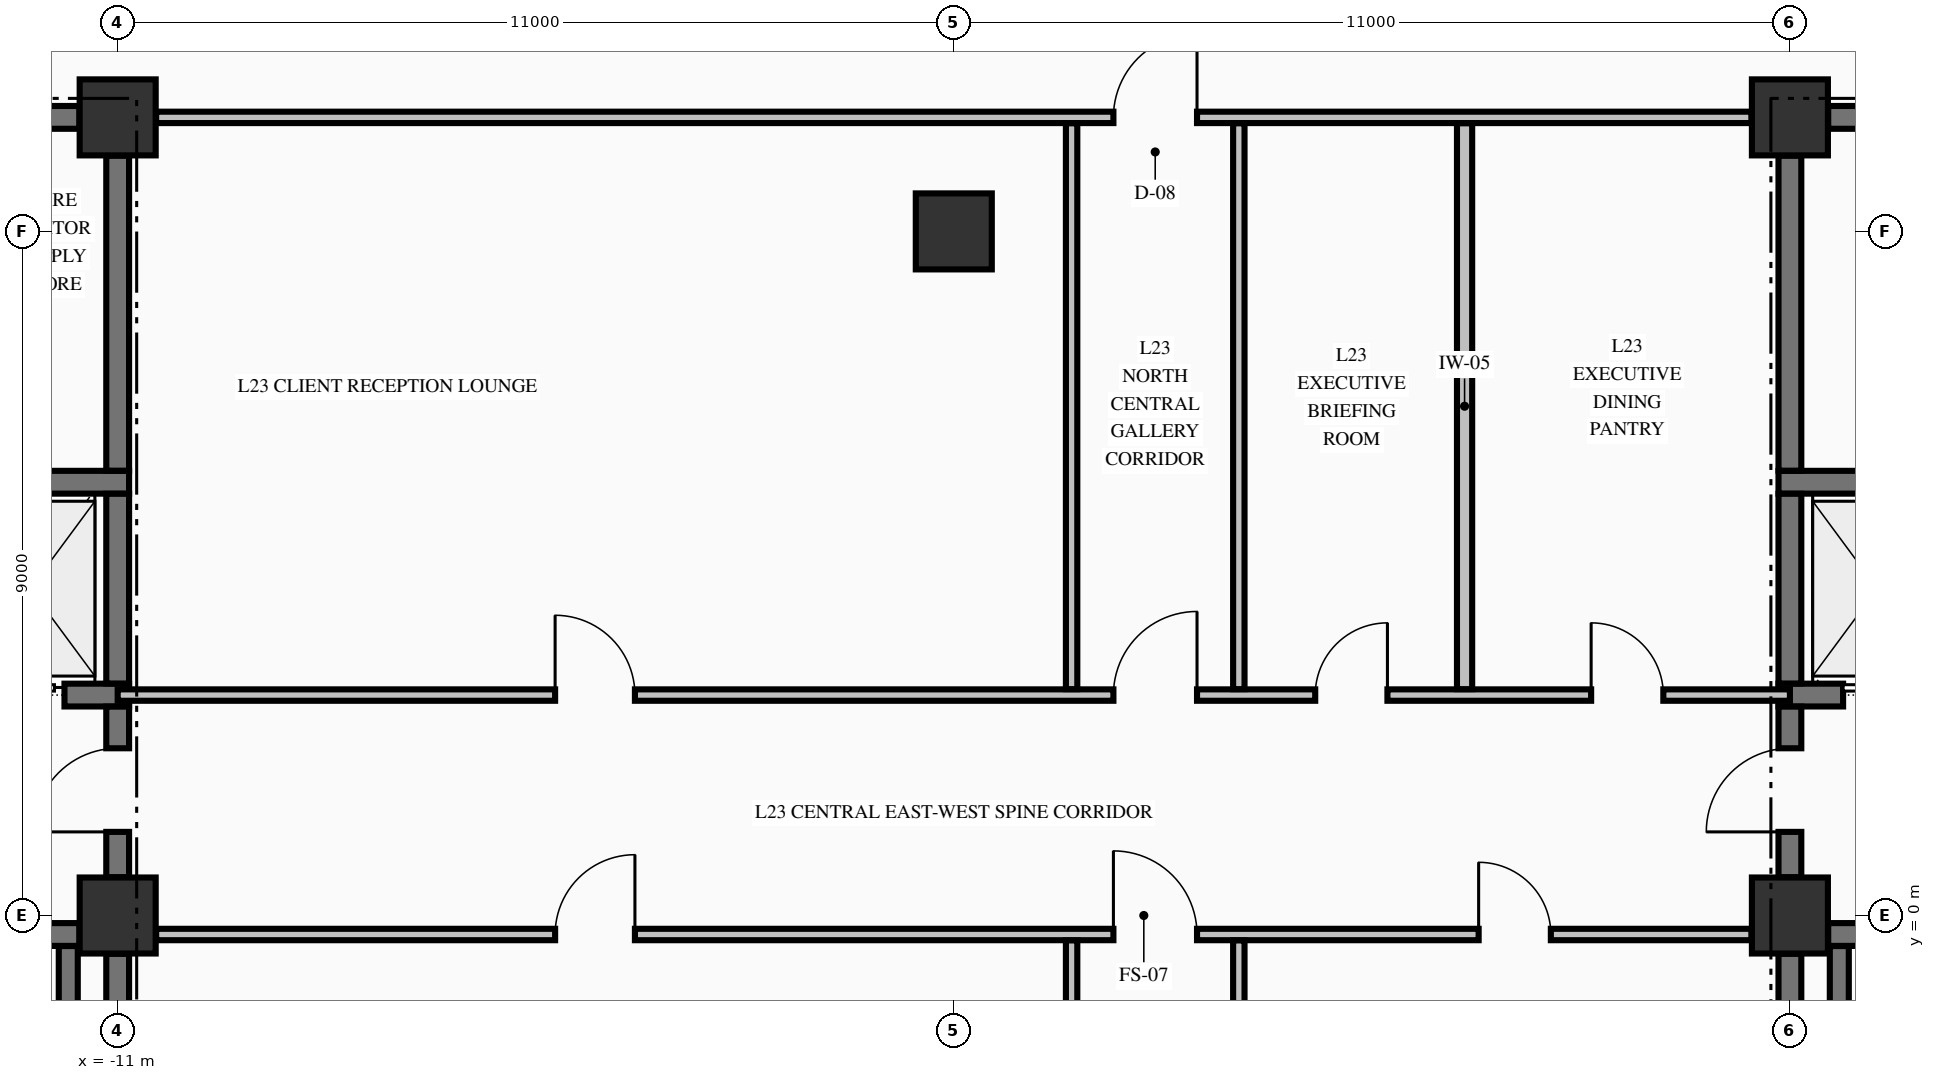
"""IFC4 building model, lengths in metres.
Left out: names, types, materials, properties, quantities, classifications, styles, units other than length and angle.
Written with IfcOpenShell. Run it as: python <this file> out.ifc"""

import sys

from ifc_helpers import new_model, si_unit, direction, frame, frame_2d, origin, origin_2d, place, context, subcontext, project, spatial, rectangle, extrude, element, fill, save


model = new_model("IFC4")
c1 = context("Model", 3, precision=1e-05, world=origin(), true_north=direction((0.0, 1.0)))
c2 = subcontext(c1, "Body", "Model", "MODEL_VIEW")
j1 = project(units=[si_unit("LENGTHUNIT", "METRE"), si_unit("PLANEANGLEUNIT", "RADIAN")], contexts=[c1])
p1 = place(None, origin())
s1 = spatial("IfcSite", under=j1, at=p1, CompositionType="ELEMENT")
p2 = place(p1, origin())
s2 = spatial("IfcBuilding", under=s1, at=p2, CompositionType="ELEMENT")
p3 = place(p2, frame((0.0, 0.0, 94.93)))
s3 = spatial("IfcBuildingStorey", under=s2, at=p3, CompositionType="ELEMENT", Elevation=94.93)
for number, where, z_axis, x_axis in (
    (1, (-11.0, 0.0, -0.25), (0.0, 0.0, 1.0), (1.0, 0.0, 0.0)),
    (2, (-11.0, 10.5, -0.25), (0.0, 0.0, 1.0), (1.0, 0.0, 0.0)),
    (3, (11.0, 0.0, -0.25), (0.0, 0.0, 1.0), (1.0, 0.0, 0.0)),
    (4, (11.0, 10.5, -0.25), (0.0, 0.0, 1.0), (1.0, 0.0, 0.0)),
    (5, (0.0, 9.0, -0.25), (0.0, 0.0, 1.0), (1.0, 0.0, 0.0)),
):
    element("IfcColumn", number, at=place(p3, frame(where, z_axis=z_axis, x_axis=x_axis)), inside=s3, PredefinedType="COLUMN", context=c2, shape_type="SweptSolid", body=[
        extrude(rectangle(XDim=1.0, YDim=1.0, at=origin_2d()), origin(), (0.0, 0.0, 1.0), 3.545),
    ])
p4 = place(p3, frame((-19.496, -0.25, 0.0), z_axis=(0.0, 0.0, 1.0), x_axis=(1.0, 0.0, 0.0)))
e6 = element("IfcWall", 6, at=p4, inside=s3, PredefinedType="SHEAR", context=c2, shape_type="SweptSolid", body=[
    extrude(rectangle(XDim=7.992, YDim=0.3, at=frame_2d((3.996, 0.0))), origin(), (0.0, 0.0, 1.0), 3.295),
])
p5 = place(p4, frame((5.796, 0.0, 0.0)))
e7 = element("IfcOpeningElement", 7, at=p5, cuts=e6, PredefinedType="OPENING", context=c2, shape_type="SweptSolid", body=[
    extrude(rectangle(XDim=1.1, YDim=2.15, at=frame_2d((0.55, 1.075))), frame((0.0, 0.16, 0.0), z_axis=(0.0, -1.0, 0.0), x_axis=(1.0, 0.0, 0.0)), (0.0, 0.0, 1.0), 0.32),
])
p6 = place(p3, frame((11.504, -0.25, 0.0), z_axis=(0.0, 0.0, 1.0), x_axis=(1.0, 0.0, 0.0)))
e8 = element("IfcWall", 8, at=p6, inside=s3, PredefinedType="SHEAR", context=c2, shape_type="SweptSolid", body=[
    extrude(rectangle(XDim=3.371, YDim=0.3, at=frame_2d((1.686, 0.0))), origin(), (0.0, 0.0, 1.0), 3.295),
])
p7 = place(p6, frame((1.096, 0.0, 0.0)))
e9 = element("IfcOpeningElement", 9, at=p7, cuts=e8, PredefinedType="OPENING", context=c2, shape_type="SweptSolid", body=[
    extrude(rectangle(XDim=1.1, YDim=2.15, at=frame_2d((0.55, 1.075))), frame((0.0, 0.16, 0.0), z_axis=(0.0, -1.0, 0.0), x_axis=(1.0, 0.0, 0.0)), (0.0, 0.0, 1.0), 0.32),
])
p8 = place(p3, frame((-14.875, 2.9, 0.0), z_axis=(0.0, 0.0, 1.0), x_axis=(1.0, 0.0, 0.0)))
e10 = element("IfcWall", 10, at=p8, inside=s3, PredefinedType="SHEAR", context=c2, shape_type="SweptSolid", body=[
    extrude(rectangle(XDim=4.025, YDim=0.3, at=frame_2d((2.012, 0.0))), origin(), (0.0, 0.0, 1.0), 3.295),
])
p9 = place(p8, frame((2.075, 0.0, 0.0)))
e11 = element("IfcOpeningElement", 11, at=p9, cuts=e10, PredefinedType="OPENING", context=c2, shape_type="SweptSolid", body=[
    extrude(rectangle(XDim=1.1, YDim=2.2, at=frame_2d((0.55, 1.1))), frame((0.0, 0.16, 0.0), z_axis=(0.0, -1.0, 0.0), x_axis=(1.0, 0.0, 0.0)), (0.0, 0.0, 1.0), 0.32),
])
p10 = place(p3, frame((10.85, 2.9, 0.0), z_axis=(0.0, 0.0, 1.0), x_axis=(1.0, 0.0, 0.0)))
e12 = element("IfcWall", 12, at=p10, inside=s3, PredefinedType="SHEAR", context=c2, shape_type="SweptSolid", body=[
    extrude(rectangle(XDim=4.025, YDim=0.3, at=frame_2d((2.012, 0.0))), origin(), (0.0, 0.0, 1.0), 3.295),
])
p11 = place(p10, frame((0.85, 0.0, 0.0)))
e13 = element("IfcOpeningElement", 13, at=p11, cuts=e12, PredefinedType="OPENING", context=c2, shape_type="SweptSolid", body=[
    extrude(rectangle(XDim=1.1, YDim=2.2, at=frame_2d((0.55, 1.1))), frame((0.0, 0.16, 0.0), z_axis=(0.0, -1.0, 0.0), x_axis=(1.0, 0.0, 0.0)), (0.0, 0.0, 1.0), 0.32),
])
for number, where, z_axis, x_axis in (
    (14, (-14.875, 5.7, 0.0), (0.0, 0.0, 1.0), (1.0, 0.0, 0.0)),
    (15, (10.85, 5.7, 0.0), (0.0, 0.0, 1.0), (1.0, 0.0, 0.0)),
):
    element("IfcWall", number, at=place(p3, frame(where, z_axis=z_axis, x_axis=x_axis)), inside=s3, PredefinedType="SHEAR", context=c2, shape_type="SweptSolid", body=[
        extrude(rectangle(XDim=4.025, YDim=0.3, at=frame_2d((2.012, 0.0))), origin(), (0.0, 0.0, 1.0), 3.295),
    ])
p12 = place(p3, frame((-14.7, 10.5, 0.0), z_axis=(0.0, 0.0, 1.0), x_axis=(1.0, 0.0, 0.0)))
e16 = element("IfcWall", 16, at=p12, inside=s3, PredefinedType="SHEAR", context=c2, shape_type="SweptSolid", body=[
    extrude(rectangle(XDim=3.196, YDim=0.3, at=frame_2d((1.598, 0.0))), origin(), (0.0, 0.0, 1.0), 3.295),
])
p13 = place(p12, frame((0.245, 0.0, 0.0)))
e17 = element("IfcOpeningElement", 17, at=p13, cuts=e16, PredefinedType="OPENING", context=c2, shape_type="SweptSolid", body=[
    extrude(rectangle(XDim=0.95, YDim=2.15, at=frame_2d((0.475, 1.075))), frame((0.0, 0.16, 0.0), z_axis=(0.0, -1.0, 0.0), x_axis=(1.0, 0.0, 0.0)), (0.0, 0.0, 1.0), 0.32),
])
p14 = place(p3, frame((11.504, 10.5, 0.0), z_axis=(0.0, 0.0, 1.0), x_axis=(1.0, 0.0, 0.0)))
e18 = element("IfcWall", 18, at=p14, inside=s3, PredefinedType="SHEAR", context=c2, shape_type="SweptSolid", body=[
    extrude(rectangle(XDim=3.196, YDim=0.3, at=frame_2d((1.598, 0.0))), origin(), (0.0, 0.0, 1.0), 3.295),
])
p15 = place(p14, frame((1.471, 0.0, 0.0)))
e19 = element("IfcOpeningElement", 19, at=p15, cuts=e18, PredefinedType="OPENING", context=c2, shape_type="SweptSolid", body=[
    extrude(rectangle(XDim=0.95, YDim=2.15, at=frame_2d((0.475, 1.075))), frame((0.0, 0.16, 0.0), z_axis=(0.0, -1.0, 0.0), x_axis=(1.0, 0.0, 0.0)), (0.0, 0.0, 1.0), 0.32),
])
p16 = place(p3, frame((-10.494, -0.25, 0.0), z_axis=(0.0, 0.0, 1.0), x_axis=(1.0, 0.0, 0.0)))
e20 = element("IfcWall", 20, at=p16, inside=s3, PredefinedType="PARTITIONING", context=c2, shape_type="SweptSolid", body=[
    extrude(rectangle(XDim=20.988, YDim=0.15, at=frame_2d((10.494, 0.0))), origin(), (0.0, 0.0, 1.0), 3.295),
])
p17 = place(p16, frame((12.594, 0.0, 0.0)))
e21 = element("IfcOpeningElement", 21, at=p17, cuts=e20, PredefinedType="OPENING", context=c2, shape_type="SweptSolid", body=[
    extrude(rectangle(XDim=1.1, YDim=2.15, at=frame_2d((0.55, 1.075))), frame((0.0, 0.085, 0.0), z_axis=(0.0, -1.0, 0.0), x_axis=(1.0, 0.0, 0.0)), (0.0, 0.0, 1.0), 0.17),
])
p18 = place(p16, frame((5.249, 0.0, 0.0)))
e22 = element("IfcOpeningElement", 22, at=p18, cuts=e20, PredefinedType="OPENING", context=c2, shape_type="SweptSolid", body=[
    extrude(rectangle(XDim=1.05, YDim=2.15, at=frame_2d((0.525, 1.075))), frame((0.0, 0.085, 0.0), z_axis=(0.0, -1.0, 0.0), x_axis=(1.0, 0.0, 0.0)), (0.0, 0.0, 1.0), 0.17),
])
p19 = place(p16, frame((17.399, 0.0, 0.0)))
e23 = element("IfcOpeningElement", 23, at=p19, cuts=e20, PredefinedType="OPENING", context=c2, shape_type="SweptSolid", body=[
    extrude(rectangle(XDim=0.95, YDim=2.15, at=frame_2d((0.475, 1.075))), frame((0.0, 0.085, 0.0), z_axis=(0.0, -1.0, 0.0), x_axis=(1.0, 0.0, 0.0)), (0.0, 0.0, 1.0), 0.17),
])
p20 = place(p3, frame((-11.0, 2.9, 0.0), z_axis=(0.0, 0.0, 1.0), x_axis=(1.0, 0.0, 0.0)))
e24 = element("IfcWall", 24, at=p20, inside=s3, PredefinedType="PARTITIONING", context=c2, shape_type="SweptSolid", body=[
    extrude(rectangle(XDim=22.0, YDim=0.15, at=frame_2d((11.0, 0.0))), origin(), (0.0, 0.0, 1.0), 3.295),
])
p21 = place(p20, frame((13.1, 0.0, 0.0)))
e25 = element("IfcOpeningElement", 25, at=p21, cuts=e24, PredefinedType="OPENING", context=c2, shape_type="SweptSolid", body=[
    extrude(rectangle(XDim=1.1, YDim=2.15, at=frame_2d((0.55, 1.075))), frame((0.0, 0.085, 0.0), z_axis=(0.0, -1.0, 0.0), x_axis=(1.0, 0.0, 0.0)), (0.0, 0.0, 1.0), 0.17),
])
p22 = place(p20, frame((5.755, 0.0, 0.0)))
e26 = element("IfcOpeningElement", 26, at=p22, cuts=e24, PredefinedType="OPENING", context=c2, shape_type="SweptSolid", body=[
    extrude(rectangle(XDim=1.05, YDim=2.15, at=frame_2d((0.525, 1.075))), frame((0.0, 0.085, 0.0), z_axis=(0.0, -1.0, 0.0), x_axis=(1.0, 0.0, 0.0)), (0.0, 0.0, 1.0), 0.17),
])
p23 = place(p20, frame((15.755, 0.0, 0.0)))
e27 = element("IfcOpeningElement", 27, at=p23, cuts=e24, PredefinedType="OPENING", context=c2, shape_type="SweptSolid", body=[
    extrude(rectangle(XDim=0.95, YDim=2.15, at=frame_2d((0.475, 1.075))), frame((0.0, 0.085, 0.0), z_axis=(0.0, -1.0, 0.0), x_axis=(1.0, 0.0, 0.0)), (0.0, 0.0, 1.0), 0.17),
])
p24 = place(p20, frame((19.385, 0.0, 0.0)))
e28 = element("IfcOpeningElement", 28, at=p24, cuts=e24, PredefinedType="OPENING", context=c2, shape_type="SweptSolid", body=[
    extrude(rectangle(XDim=0.95, YDim=2.15, at=frame_2d((0.475, 1.075))), frame((0.0, 0.085, 0.0), z_axis=(0.0, -1.0, 0.0), x_axis=(1.0, 0.0, 0.0)), (0.0, 0.0, 1.0), 0.17),
])
p25 = place(p3, frame((-10.494, 10.5, 0.0), z_axis=(0.0, 0.0, 1.0), x_axis=(1.0, 0.0, 0.0)))
e29 = element("IfcWall", 29, at=p25, inside=s3, PredefinedType="PARTITIONING", context=c2, shape_type="SweptSolid", body=[
    extrude(rectangle(XDim=20.988, YDim=0.15, at=frame_2d((10.494, 0.0))), origin(), (0.0, 0.0, 1.0), 3.295),
])
p26 = place(p25, frame((12.594, 0.0, 0.0)))
e30 = element("IfcOpeningElement", 30, at=p26, cuts=e29, PredefinedType="OPENING", context=c2, shape_type="SweptSolid", body=[
    extrude(rectangle(XDim=1.1, YDim=2.15, at=frame_2d((0.55, 1.075))), frame((0.0, 0.085, 0.0), z_axis=(0.0, -1.0, 0.0), x_axis=(1.0, 0.0, 0.0)), (0.0, 0.0, 1.0), 0.17),
])
p27 = place(p3, frame((-11.65, -9.798, 0.0), z_axis=(0.0, 0.0, 1.0), x_axis=(0.0, 1.0, 0.0)))
e31 = element("IfcWall", 31, at=p27, inside=s3, PredefinedType="SOLIDWALL", context=c2, shape_type="SweptSolid", body=[
    extrude(rectangle(XDim=9.396, YDim=0.25, at=frame_2d((4.698, 0.0))), origin(), (0.0, 0.0, 1.0), 3.295),
])
p28 = place(p3, frame((-11.0, -9.446, 0.0), z_axis=(0.0, 0.0, 1.0), x_axis=(0.0, 1.0, 0.0)))
e32 = element("IfcWall", 32, at=p28, inside=s3, PredefinedType="SHEAR", context=c2, shape_type="SweptSolid", body=[
    extrude(rectangle(XDim=8.942, YDim=0.3, at=frame_2d((4.471, 0.0))), origin(), (0.0, 0.0, 1.0), 3.295),
])
p29 = place(p3, frame((-11.0, 0.504, 0.0), z_axis=(0.0, 0.0, 1.0), x_axis=(0.0, 1.0, 0.0)))
e33 = element("IfcWall", 33, at=p29, inside=s3, PredefinedType="SHEAR", context=c2, shape_type="SweptSolid", body=[
    extrude(rectangle(XDim=2.244, YDim=0.3, at=frame_2d((1.122, 0.0))), origin(), (0.0, 0.0, 1.0), 3.295),
])
p30 = place(p29, frame((0.596, 0.0, 0.0)))
e34 = element("IfcOpeningElement", 34, at=p30, cuts=e33, PredefinedType="OPENING", context=c2, shape_type="SweptSolid", body=[
    extrude(rectangle(XDim=1.1, YDim=2.15, at=frame_2d((0.55, 1.075))), frame((0.0, 0.16, 0.0), z_axis=(0.0, -1.0, 0.0), x_axis=(1.0, 0.0, 0.0)), (0.0, 0.0, 1.0), 0.32),
])
p31 = place(p3, frame((-11.0, 3.052, 0.0), z_axis=(0.0, 0.0, 1.0), x_axis=(0.0, 1.0, 0.0)))
e35 = element("IfcWall", 35, at=p31, inside=s3, PredefinedType="SHEAR", context=c2, shape_type="SweptSolid", body=[
    extrude(rectangle(XDim=2.496, YDim=0.3, at=frame_2d((1.248, 0.0))), origin(), (0.0, 0.0, 1.0), 3.295),
])
p32 = place(p3, frame((-11.0, 5.852, 0.0), z_axis=(0.0, 0.0, 1.0), x_axis=(0.0, 1.0, 0.0)))
e36 = element("IfcWall", 36, at=p32, inside=s3, PredefinedType="SHEAR", context=c2, shape_type="SweptSolid", body=[
    extrude(rectangle(XDim=4.144, YDim=0.3, at=frame_2d((2.072, 0.0))), origin(), (0.0, 0.0, 1.0), 3.295),
])
p33 = place(p3, frame((11.0, -9.446, 0.0), z_axis=(0.0, 0.0, 1.0), x_axis=(0.0, 1.0, 0.0)))
e37 = element("IfcWall", 37, at=p33, inside=s3, PredefinedType="SHEAR", context=c2, shape_type="SweptSolid", body=[
    extrude(rectangle(XDim=8.942, YDim=0.3, at=frame_2d((4.471, 0.0))), origin(), (0.0, 0.0, 1.0), 3.295),
])
p34 = place(p3, frame((11.0, 0.504, 0.0), z_axis=(0.0, 0.0, 1.0), x_axis=(0.0, 1.0, 0.0)))
e38 = element("IfcWall", 38, at=p34, inside=s3, PredefinedType="SHEAR", context=c2, shape_type="SweptSolid", body=[
    extrude(rectangle(XDim=2.244, YDim=0.3, at=frame_2d((1.122, 0.0))), origin(), (0.0, 0.0, 1.0), 3.295),
])
p35 = place(p34, frame((0.596, 0.0, 0.0)))
e39 = element("IfcOpeningElement", 39, at=p35, cuts=e38, PredefinedType="OPENING", context=c2, shape_type="SweptSolid", body=[
    extrude(rectangle(XDim=1.1, YDim=2.15, at=frame_2d((0.55, 1.075))), frame((0.0, 0.16, 0.0), z_axis=(0.0, -1.0, 0.0), x_axis=(1.0, 0.0, 0.0)), (0.0, 0.0, 1.0), 0.32),
])
p36 = place(p3, frame((11.0, 3.052, 0.0), z_axis=(0.0, 0.0, 1.0), x_axis=(0.0, 1.0, 0.0)))
e40 = element("IfcWall", 40, at=p36, inside=s3, PredefinedType="SHEAR", context=c2, shape_type="SweptSolid", body=[
    extrude(rectangle(XDim=2.496, YDim=0.3, at=frame_2d((1.248, 0.0))), origin(), (0.0, 0.0, 1.0), 3.295),
])
p37 = place(p3, frame((11.0, 5.852, 0.0), z_axis=(0.0, 0.0, 1.0), x_axis=(0.0, 1.0, 0.0)))
e41 = element("IfcWall", 41, at=p37, inside=s3, PredefinedType="SHEAR", context=c2, shape_type="SweptSolid", body=[
    extrude(rectangle(XDim=4.144, YDim=0.3, at=frame_2d((2.072, 0.0))), origin(), (0.0, 0.0, 1.0), 3.295),
])
p38 = place(p3, frame((11.65, -9.798, 0.0), z_axis=(0.0, 0.0, 1.0), x_axis=(0.0, 1.0, 0.0)))
e42 = element("IfcWall", 42, at=p38, inside=s3, PredefinedType="SOLIDWALL", context=c2, shape_type="SweptSolid", body=[
    extrude(rectangle(XDim=9.396, YDim=0.25, at=frame_2d((4.698, 0.0))), origin(), (0.0, 0.0, 1.0), 3.295),
])
p39 = place(p3, frame((1.55, -9.872, 0.0), z_axis=(0.0, 0.0, 1.0), x_axis=(0.0, 1.0, 0.0)))
e43 = element("IfcWall", 43, at=p39, inside=s3, PredefinedType="PARTITIONING", context=c2, shape_type="SweptSolid", body=[
    extrude(rectangle(XDim=9.544, YDim=0.15, at=frame_2d((4.772, 0.0))), origin(), (0.0, 0.0, 1.0), 3.295),
])
p40 = place(p3, frame((1.55, 2.978, 0.0), z_axis=(0.0, 0.0, 1.0), x_axis=(0.0, 1.0, 0.0)))
e44 = element("IfcWall", 44, at=p40, inside=s3, PredefinedType="PARTITIONING", context=c2, shape_type="SweptSolid", body=[
    extrude(rectangle(XDim=7.444, YDim=0.15, at=frame_2d((3.722, 0.0))), origin(), (0.0, 0.0, 1.0), 3.295),
])
p41 = place(p3, frame((3.75, -4.147, 0.0), z_axis=(0.0, 0.0, 1.0), x_axis=(0.0, 1.0, 0.0)))
e45 = element("IfcWall", 45, at=p41, inside=s3, PredefinedType="PARTITIONING", context=c2, shape_type="SweptSolid", body=[
    extrude(rectangle(XDim=3.819, YDim=0.15, at=frame_2d((1.91, 0.0))), origin(), (0.0, 0.0, 1.0), 3.295),
])
p42 = place(p3, frame((3.75, 2.978, 0.0), z_axis=(0.0, 0.0, 1.0), x_axis=(0.0, 1.0, 0.0)))
e46 = element("IfcWall", 46, at=p42, inside=s3, PredefinedType="PARTITIONING", context=c2, shape_type="SweptSolid", body=[
    extrude(rectangle(XDim=7.444, YDim=0.15, at=frame_2d((3.722, 0.0))), origin(), (0.0, 0.0, 1.0), 3.295),
])
p43 = place(p3, frame((6.72, 2.978, 0.0), z_axis=(0.0, 0.0, 1.0), x_axis=(0.0, 1.0, 0.0)))
e47 = element("IfcWall", 47, at=p43, inside=s3, PredefinedType="PARTITIONING", context=c2, shape_type="SweptSolid", body=[
    extrude(rectangle(XDim=7.444, YDim=0.2, at=frame_2d((3.722, 0.0))), origin(), (0.0, 0.0, 1.0), 3.295),
])
p44 = place(p30, origin())
e48 = element("IfcDoor", 48, at=p44, inside=s3, OperationType="SINGLE_SWING_LEFT", PredefinedType="DOOR", context=c2, shape_type="SweptSolid", body=[
    extrude(rectangle(XDim=1.1, YDim=2.15, at=frame_2d((0.55, 1.075))), frame((0.0, 0.025, 0.0), z_axis=(0.0, -1.0, 0.0), x_axis=(1.0, 0.0, 0.0)), (0.0, 0.0, 1.0), 0.05),
])
fill(e34, e48)
p45 = place(p9, origin())
e49 = element("IfcDoor", 49, at=p45, inside=s3, OperationType="SLIDING_TO_LEFT", PredefinedType="DOOR", context=c2, shape_type="SweptSolid", body=[
    extrude(rectangle(XDim=1.1, YDim=2.2, at=frame_2d((0.55, 1.1))), frame((0.0, 0.025, 0.0), z_axis=(0.0, -1.0, 0.0), x_axis=(1.0, 0.0, 0.0)), (0.0, 0.0, 1.0), 0.05),
])
fill(e11, e49)
p46 = place(p35, origin())
e50 = element("IfcDoor", 50, at=p46, inside=s3, OperationType="SINGLE_SWING_LEFT", PredefinedType="DOOR", context=c2, shape_type="SweptSolid", body=[
    extrude(rectangle(XDim=1.1, YDim=2.15, at=frame_2d((0.55, 1.075))), frame((0.0, 0.025, 0.0), z_axis=(0.0, -1.0, 0.0), x_axis=(1.0, 0.0, 0.0)), (0.0, 0.0, 1.0), 0.05),
])
fill(e39, e50)
p47 = place(p11, origin())
e51 = element("IfcDoor", 51, at=p47, inside=s3, OperationType="SLIDING_TO_RIGHT", PredefinedType="DOOR", context=c2, shape_type="SweptSolid", body=[
    extrude(rectangle(XDim=1.1, YDim=2.2, at=frame_2d((0.55, 1.1))), frame((0.0, 0.025, 0.0), z_axis=(0.0, -1.0, 0.0), x_axis=(1.0, 0.0, 0.0)), (0.0, 0.0, 1.0), 0.05),
])
fill(e13, e51)
p48 = place(p26, origin())
e52 = element("IfcDoor", 52, at=p48, inside=s3, OperationType="SINGLE_SWING_RIGHT", PredefinedType="DOOR", context=c2, shape_type="SweptSolid", body=[
    extrude(rectangle(XDim=1.1, YDim=2.15, at=frame_2d((0.55, 1.075))), frame((0.0, 0.025, 0.0), z_axis=(0.0, -1.0, 0.0), x_axis=(1.0, 0.0, 0.0)), (0.0, 0.0, 1.0), 0.05),
])
fill(e30, e52)
p49 = place(p21, origin())
e53 = element("IfcDoor", 53, at=p49, inside=s3, OperationType="SINGLE_SWING_RIGHT", PredefinedType="DOOR", context=c2, shape_type="SweptSolid", body=[
    extrude(rectangle(XDim=1.1, YDim=2.15, at=frame_2d((0.55, 1.075))), frame((0.0, 0.025, 0.0), z_axis=(0.0, -1.0, 0.0), x_axis=(1.0, 0.0, 0.0)), (0.0, 0.0, 1.0), 0.05),
])
fill(e25, e53)
p50 = place(p17, origin())
e54 = element("IfcDoor", 54, at=p50, inside=s3, OperationType="SINGLE_SWING_LEFT", PredefinedType="DOOR", context=c2, shape_type="SweptSolid", body=[
    extrude(rectangle(XDim=1.1, YDim=2.15, at=frame_2d((0.55, 1.075))), frame((0.0, 0.025, 0.0), z_axis=(0.0, -1.0, 0.0), x_axis=(1.0, 0.0, 0.0)), (0.0, 0.0, 1.0), 0.05),
])
fill(e21, e54)
p51 = place(p22, origin())
e55 = element("IfcDoor", 55, at=p51, inside=s3, OperationType="SINGLE_SWING_LEFT", PredefinedType="DOOR", context=c2, shape_type="SweptSolid", body=[
    extrude(rectangle(XDim=1.05, YDim=2.15, at=frame_2d((0.525, 1.075))), frame((0.0, 0.025, 0.0), z_axis=(0.0, -1.0, 0.0), x_axis=(1.0, 0.0, 0.0)), (0.0, 0.0, 1.0), 0.05),
])
fill(e26, e55)
p52 = place(p23, origin())
e56 = element("IfcDoor", 56, at=p52, inside=s3, OperationType="SINGLE_SWING_RIGHT", PredefinedType="DOOR", context=c2, shape_type="SweptSolid", body=[
    extrude(rectangle(XDim=0.95, YDim=2.15, at=frame_2d((0.475, 1.075))), frame((0.0, 0.025, 0.0), z_axis=(0.0, -1.0, 0.0), x_axis=(1.0, 0.0, 0.0)), (0.0, 0.0, 1.0), 0.05),
])
fill(e27, e56)
p53 = place(p24, origin())
e57 = element("IfcDoor", 57, at=p53, inside=s3, OperationType="SINGLE_SWING_LEFT", PredefinedType="DOOR", context=c2, shape_type="SweptSolid", body=[
    extrude(rectangle(XDim=0.95, YDim=2.15, at=frame_2d((0.475, 1.075))), frame((0.0, 0.025, 0.0), z_axis=(0.0, -1.0, 0.0), x_axis=(1.0, 0.0, 0.0)), (0.0, 0.0, 1.0), 0.05),
])
fill(e28, e57)
p54 = place(p18, origin())
e58 = element("IfcDoor", 58, at=p54, inside=s3, OperationType="SINGLE_SWING_RIGHT", PredefinedType="DOOR", context=c2, shape_type="SweptSolid", body=[
    extrude(rectangle(XDim=1.05, YDim=2.15, at=frame_2d((0.525, 1.075))), frame((0.0, 0.025, 0.0), z_axis=(0.0, -1.0, 0.0), x_axis=(1.0, 0.0, 0.0)), (0.0, 0.0, 1.0), 0.05),
])
fill(e22, e58)
p55 = place(p19, origin())
e59 = element("IfcDoor", 59, at=p55, inside=s3, OperationType="SINGLE_SWING_LEFT", PredefinedType="DOOR", context=c2, shape_type="SweptSolid", body=[
    extrude(rectangle(XDim=0.95, YDim=2.15, at=frame_2d((0.475, 1.075))), frame((0.0, 0.025, 0.0), z_axis=(0.0, -1.0, 0.0), x_axis=(1.0, 0.0, 0.0)), (0.0, 0.0, 1.0), 0.05),
])
fill(e23, e59)
save(model, sys.argv[1])
